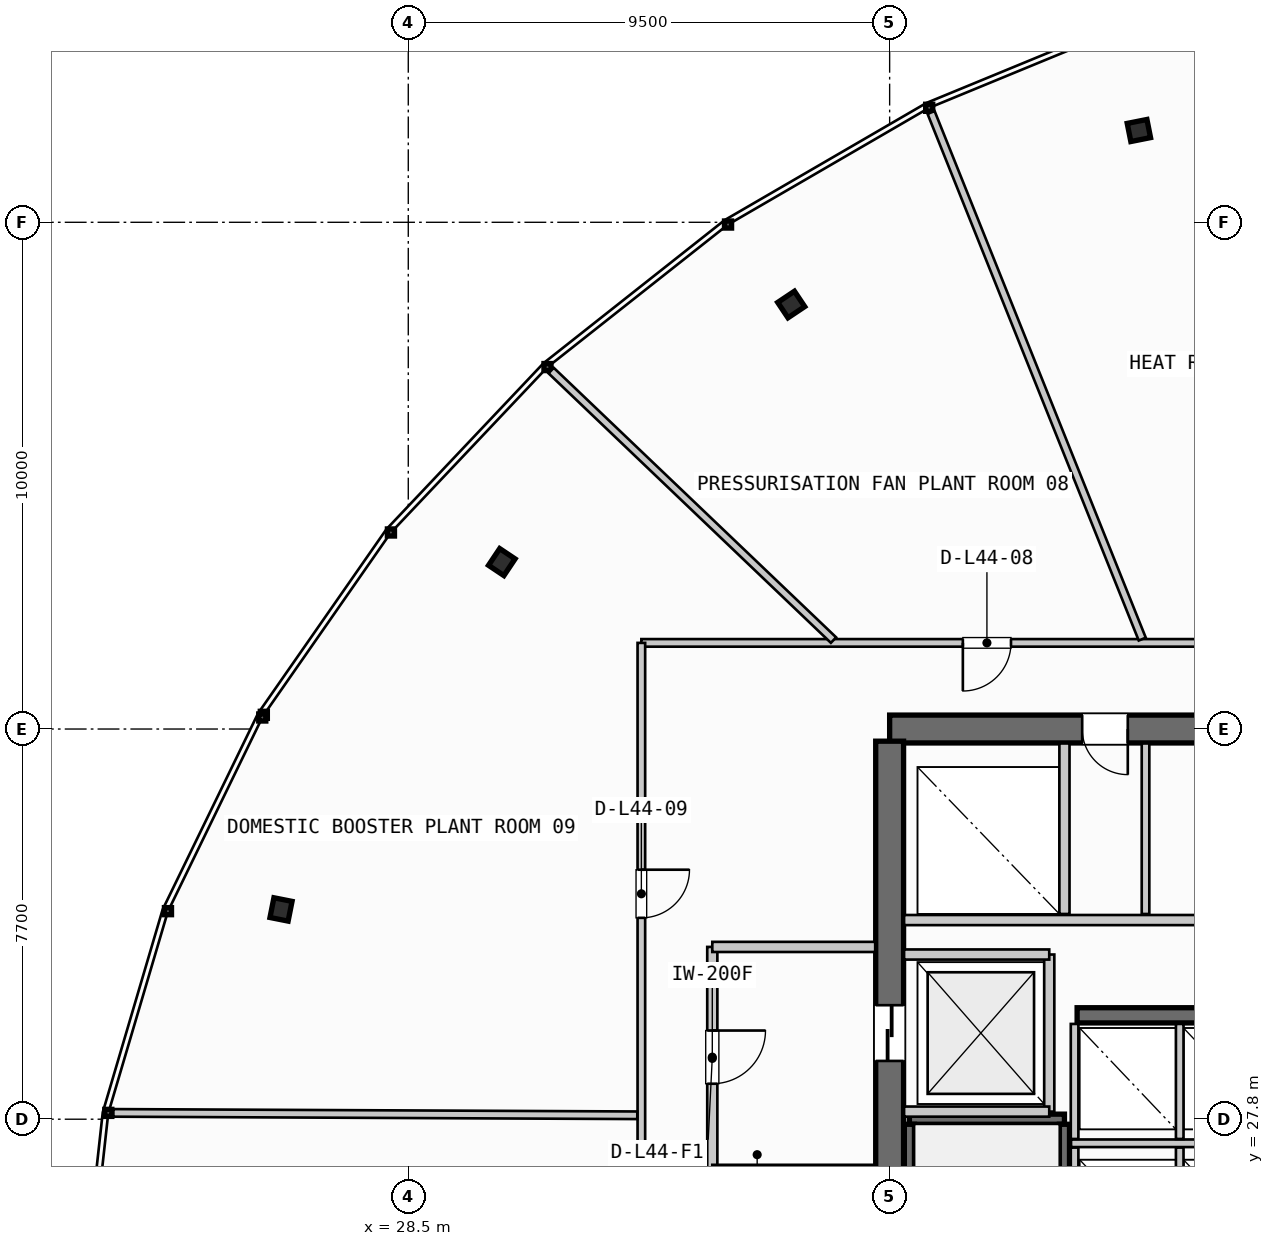
"""IFC4 building model, lengths in metres.
Left out: names, types, materials, properties, quantities, classifications, styles, units other than length and angle.
Written with IfcOpenShell. Run it as: python <this file> out.ifc"""

import sys

from ifc_helpers import new_model, si_unit, direction, frame, frame_2d, origin, origin_2d, place, context, subcontext, project, spatial, rectangle, i_section, extrude, source, transform, mapped, element, fill, save


model = new_model("IFC4")
c1 = context("Model", 3, precision=1e-05, world=origin(), true_north=direction((0.0, 1.0)))
c2 = subcontext(c1, "Body", "Model", "MODEL_VIEW")
j1 = project(units=[si_unit("LENGTHUNIT", "METRE"), si_unit("PLANEANGLEUNIT", "RADIAN")], contexts=[c1])
p1 = place(None, origin())
s1 = spatial("IfcSite", under=j1, at=p1, CompositionType="ELEMENT")
p2 = place(p1, origin())
s2 = spatial("IfcBuilding", under=s1, at=p2, CompositionType="ELEMENT")
p3 = place(p2, frame((0.0, 0.0, 171.4)))
s3 = spatial("IfcBuildingStorey", under=s2, at=p3, CompositionType="ELEMENT", Elevation=171.4)
p4 = place(p3, frame((55.6, 35.5, 0.0), z_axis=(0.0, 0.0, 1.0), x_axis=(-1.0, 0.0, 0.0)))
e1 = element("IfcWall", 1, at=p4, inside=s3, PredefinedType="SHEAR", context=c2, shape_type="SweptSolid", body=[
    extrude(rectangle(XDim=17.6, YDim=0.55, at=frame_2d((8.8, 0.0))), origin(), (0.0, 0.0, 1.0), 4.58),
])
p5 = place(p4, frame((8.05, 0.0, 0.0)))
e2 = element("IfcOpeningElement", 2, at=p5, cuts=e1, PredefinedType="OPENING", context=c2, shape_type="SweptSolid", body=[
    extrude(rectangle(XDim=1.5, YDim=2.2, at=frame_2d((0.75, 1.1))), frame((0.0, 0.285, 0.0), z_axis=(0.0, -1.0, 0.0), x_axis=(1.0, 0.0, 0.0)), (0.0, 0.0, 1.0), 0.57),
])
p6 = place(p4, frame((12.9, 0.0, 0.0)))
e3 = element("IfcOpeningElement", 3, at=p6, cuts=e1, PredefinedType="OPENING", context=c2, shape_type="SweptSolid", body=[
    extrude(rectangle(XDim=0.9, YDim=2.15, at=frame_2d((0.45, 1.075))), frame((0.0, 0.285, 0.0), z_axis=(0.0, -1.0, 0.0), x_axis=(1.0, 0.0, 0.0)), (0.0, 0.0, 1.0), 0.57),
])
p7 = place(p4, frame((10.6, 0.0, 0.0)))
e4 = element("IfcOpeningElement", 4, at=p7, cuts=e1, PredefinedType="OPENING", context=c2, shape_type="SweptSolid", body=[
    extrude(rectangle(XDim=0.95, YDim=2.15, at=frame_2d((0.475, 1.075))), frame((0.0, 0.285, 0.0), z_axis=(0.0, -1.0, 0.0), x_axis=(1.0, 0.0, 0.0)), (0.0, 0.0, 1.0), 0.57),
])
p8 = place(p3, frame((38.0, 35.26, 0.0), z_axis=(0.0, 0.0, 1.0), x_axis=(0.0, -1.0, 0.0)))
e5 = element("IfcWall", 5, at=p8, inside=s3, PredefinedType="SHEAR", context=c2, shape_type="SweptSolid", body=[
    extrude(rectangle(XDim=14.92, YDim=0.55, at=frame_2d((7.46, 0.0))), origin(), (0.0, 0.0, 1.0), 4.58),
])
p9 = place(p8, frame((5.21, 0.0, 0.0)))
e6 = element("IfcOpeningElement", 6, at=p9, cuts=e5, PredefinedType="OPENING", context=c2, shape_type="SweptSolid", body=[
    extrude(rectangle(XDim=1.1, YDim=2.2, at=frame_2d((0.55, 1.1))), frame((0.0, 0.285, 0.0), z_axis=(0.0, -1.0, 0.0), x_axis=(1.0, 0.0, 0.0)), (0.0, 0.0, 1.0), 0.57),
])
p10 = place(p3, frame((41.7, 29.85, 0.0), z_axis=(0.0, 0.0, 1.0), x_axis=(1.0, 0.0, 0.0)))
e7 = element("IfcWall", 7, at=p10, inside=s3, PredefinedType="SHEAR", context=c2, shape_type="SweptSolid", body=[
    extrude(rectangle(XDim=4.25, YDim=0.3, at=frame_2d((2.125, 0.0))), origin(), (0.0, 0.0, 1.0), 4.58),
])
m1 = source(origin(), c2, "Body", "SweptSolid", [
    extrude(i_section(OverallWidth=0.397, OverallDepth=0.365, WebThickness=0.028, FlangeThickness=0.044, FilletRadius=0.015, at=origin_2d()), origin(), (0.0, 0.0, 1.0), 4.58),
])
for number, where, z_axis, x_axis in (
    (8, (42.919, 47.311, 0.0), (0.0, 0.0, 1.0), (-0.195, 0.981, 0.0)),
    (9, (36.058, 43.877, 0.0), (0.0, 0.0, 1.0), (-0.556, 0.831, 0.0)),
    (10, (30.346, 38.794, 0.0), (0.0, 0.0, 1.0), (-0.831, 0.556, 0.0)),
    (11, (25.989, 31.94, 0.0), (0.0, 0.0, 1.0), (-0.981, 0.195, 0.0)),
):
    element("IfcColumn", number, at=place(p3, frame(where, z_axis=z_axis, x_axis=x_axis)), inside=s3, PredefinedType="COLUMN", context=c2, shape_type="MappedRepresentation", body=[
        mapped(m1, transform((0.0, 0.0, 0.0), scale=1.0)),
    ])
p11 = place(p3, frame((38.39, 27.8, 0.0), z_axis=(0.0, 0.0, 1.0), x_axis=(1.0, 0.0, 0.0)))
e12 = element("IfcWall", 12, at=p11, inside=s3, PredefinedType="SHEAR", context=c2, shape_type="SweptSolid", body=[
    extrude(rectangle(XDim=3.06, YDim=0.2, at=frame_2d((1.53, 0.0))), origin(), (0.0, 0.0, 1.0), 4.58),
])
for number, where, z_axis, x_axis in (
    (13, (41.45, 27.7, 0.0), (0.0, 0.0, 1.0), (0.0, -1.0, 0.0)),
    (14, (38.39, 20.35, 0.0), (0.0, 0.0, 1.0), (0.0, 1.0, 0.0)),
):
    element("IfcWall", number, at=place(p3, frame(where, z_axis=z_axis, x_axis=x_axis)), inside=s3, PredefinedType="SHEAR", context=c2, shape_type="SweptSolid", body=[
        extrude(rectangle(XDim=7.35, YDim=0.2, at=frame_2d((3.675, 0.0))), origin(), (0.0, 0.0, 1.0), 4.58),
    ])
p12 = place(p3, frame((41.15, 27.95, 0.0), z_axis=(0.0, 0.0, 1.0), x_axis=(0.0, 1.0, 0.0)))
e15 = element("IfcWall", 15, at=p12, inside=s3, PredefinedType="PARTITIONING", context=c2, shape_type="SweptSolid", body=[
    extrude(rectangle(XDim=3.1, YDim=0.2, at=frame_2d((1.55, 0.0))), origin(), (0.0, 0.0, 1.0), 2.355),
])
for number, where, z_axis, x_axis in (
    (16, (38.285, 27.95, 0.0), (0.0, 0.0, 1.0), (1.0, 0.0, 0.0)),
    (17, (38.285, 31.05, 0.0), (0.0, 0.0, 1.0), (1.0, 0.0, 0.0)),
):
    element("IfcWall", number, at=place(p3, frame(where, z_axis=z_axis, x_axis=x_axis)), inside=s3, PredefinedType="PARTITIONING", context=c2, shape_type="SweptSolid", body=[
        extrude(rectangle(XDim=2.865, YDim=0.2, at=frame_2d((1.433, 0.0))), origin(), (0.0, 0.0, 1.0), 2.355),
    ])
p13 = place(p3, frame((34.5, 31.2, 0.0), z_axis=(0.0, 0.0, 1.0), x_axis=(0.0, -1.0, 0.0)))
e18 = element("IfcWall", 18, at=p13, inside=s3, PredefinedType="PARTITIONING", context=c2, shape_type="SweptSolid", body=[
    extrude(rectangle(XDim=4.4, YDim=0.2, at=frame_2d((2.2, 0.0))), origin(), (0.0, 0.0, 1.0), 2.355),
])
p14 = place(p13, frame((1.65, 0.0, 0.0)))
e19 = element("IfcOpeningElement", 19, at=p14, cuts=e18, PredefinedType="OPENING", context=c2, shape_type="SweptSolid", body=[
    extrude(rectangle(XDim=1.05, YDim=2.15, at=frame_2d((0.525, 1.075))), frame((0.0, 0.11, 0.0), z_axis=(0.0, -1.0, 0.0), x_axis=(1.0, 0.0, 0.0)), (0.0, 0.0, 1.0), 0.22),
])
for number, where, z_axis, x_axis in (
    (20, (34.5, 26.8, 0.0), (0.0, 0.0, 1.0), (1.0, 0.0, 0.0)),
    (21, (34.5, 31.2, 0.0), (0.0, 0.0, 1.0), (1.0, 0.0, 0.0)),
):
    element("IfcWall", number, at=place(p3, frame(where, z_axis=z_axis, x_axis=x_axis)), inside=s3, PredefinedType="PARTITIONING", context=c2, shape_type="SweptSolid", body=[
        extrude(rectangle(XDim=3.215, YDim=0.2, at=frame_2d((1.607, 0.0))), origin(), (0.0, 0.0, 1.0), 2.355),
    ])
p15 = place(p3, frame((41.58, 27.325, 0.0), z_axis=(0.0, 0.0, 1.0), x_axis=(1.0, 0.0, 0.0)))
e22 = element("IfcWall", 22, at=p15, inside=s3, PredefinedType="PARTITIONING", context=c2, shape_type="SweptSolid", body=[
    extrude(rectangle(XDim=4.32, YDim=0.15, at=frame_2d((2.16, 0.0))), origin(), (0.0, 0.0, 1.0), 2.355),
])
for number, where, z_axis, x_axis in (
    (23, (41.65, 24.92, 0.0), (0.0, 0.0, 1.0), (0.0, 1.0, 0.0)),
    (24, (43.725, 24.92, 0.0), (0.0, 0.0, 1.0), (0.0, 1.0, 0.0)),
):
    element("IfcWall", number, at=place(p3, frame(where, z_axis=z_axis, x_axis=x_axis)), inside=s3, PredefinedType="PARTITIONING", context=c2, shape_type="SweptSolid", body=[
        extrude(rectangle(XDim=2.32, YDim=0.15, at=frame_2d((1.16, 0.0))), origin(), (0.0, 0.0, 1.0), 2.355),
    ])
for number, where, z_axis, x_axis in (
    (25, (41.65, 27.41, 0.0), (0.0, 0.0, 1.0), (0.0, 1.0, 0.0)),
    (26, (43.725, 27.41, 0.0), (0.0, 0.0, 1.0), (0.0, 1.0, 0.0)),
):
    element("IfcWall", number, at=place(p3, frame(where, z_axis=z_axis, x_axis=x_axis)), inside=s3, PredefinedType="PARTITIONING", context=c2, shape_type="SweptSolid", body=[
        extrude(rectangle(XDim=2.27, YDim=0.15, at=frame_2d((1.135, 0.0))), origin(), (0.0, 0.0, 1.0), 2.355),
    ])
p16 = place(p3, frame((41.45, 31.85, 0.0), z_axis=(0.0, 0.0, 1.0), x_axis=(0.0, 1.0, 0.0)))
e27 = element("IfcWall", 27, at=p16, inside=s3, PredefinedType="PARTITIONING", context=c2, shape_type="SweptSolid", body=[
    extrude(rectangle(XDim=3.365, YDim=0.2, at=frame_2d((1.683, 0.0))), origin(), (0.0, 0.0, 1.0), 2.355),
])
p17 = place(p3, frame((38.285, 31.73, 0.0), z_axis=(0.0, 0.0, 1.0), x_axis=(1.0, 0.0, 0.0)))
e28 = element("IfcWall", 28, at=p17, inside=s3, PredefinedType="PARTITIONING", context=c2, shape_type="SweptSolid", body=[
    extrude(rectangle(XDim=7.515, YDim=0.2, at=frame_2d((3.758, 0.0))), origin(), (0.0, 0.0, 1.0), 2.355),
])
p18 = place(p3, frame((43.05, 31.85, 0.0), z_axis=(0.0, 0.0, 1.0), x_axis=(0.0, 1.0, 0.0)))
e29 = element("IfcWall", 29, at=p18, inside=s3, PredefinedType="PLUMBINGWALL", context=c2, shape_type="SweptSolid", body=[
    extrude(rectangle(XDim=3.365, YDim=0.15, at=frame_2d((1.683, 0.0))), origin(), (0.0, 0.0, 1.0), 2.355),
])
p19 = place(p3, frame((60.5, 37.2, 0.0), z_axis=(0.0, 0.0, 1.0), x_axis=(-1.0, 0.0, 0.0)))
e30 = element("IfcWall", 30, at=p19, inside=s3, PredefinedType="PARTITIONING", context=c2, shape_type="SweptSolid", body=[
    extrude(rectangle(XDim=27.4, YDim=0.15, at=frame_2d((13.7, 0.0))), origin(), (0.0, 0.0, 1.0), 2.355),
])
p20 = place(p19, frame((5.739, 0.0, 0.0)))
e31 = element("IfcOpeningElement", 31, at=p20, cuts=e30, PredefinedType="OPENING", context=c2, shape_type="SweptSolid", body=[
    extrude(rectangle(XDim=0.95, YDim=2.15, at=frame_2d((0.475, 1.075))), frame((0.0, 0.085, 0.0), z_axis=(0.0, -1.0, 0.0), x_axis=(1.0, 0.0, 0.0)), (0.0, 0.0, 1.0), 0.17),
])
p21 = place(p19, frame((13.038, 0.0, 0.0)))
e32 = element("IfcOpeningElement", 32, at=p21, cuts=e30, PredefinedType="OPENING", context=c2, shape_type="SweptSolid", body=[
    extrude(rectangle(XDim=0.95, YDim=2.15, at=frame_2d((0.475, 1.075))), frame((0.0, 0.085, 0.0), z_axis=(0.0, -1.0, 0.0), x_axis=(1.0, 0.0, 0.0)), (0.0, 0.0, 1.0), 0.17),
])
p22 = place(p19, frame((20.105, 0.0, 0.0)))
e33 = element("IfcOpeningElement", 33, at=p22, cuts=e30, PredefinedType="OPENING", context=c2, shape_type="SweptSolid", body=[
    extrude(rectangle(XDim=0.95, YDim=2.15, at=frame_2d((0.475, 1.075))), frame((0.0, 0.085, 0.0), z_axis=(0.0, -1.0, 0.0), x_axis=(1.0, 0.0, 0.0)), (0.0, 0.0, 1.0), 0.17),
])
p23 = place(p3, frame((33.1, 37.2, 0.0), z_axis=(0.0, 0.0, 1.0), x_axis=(0.0, -1.0, 0.0)))
e34 = element("IfcWall", 34, at=p23, inside=s3, PredefinedType="PARTITIONING", context=c2, shape_type="SweptSolid", body=[
    extrude(rectangle(XDim=18.8, YDim=0.15, at=frame_2d((9.4, 0.0))), origin(), (0.0, 0.0, 1.0), 2.355),
])
p24 = place(p23, frame((4.476, 0.0, 0.0)))
e35 = element("IfcOpeningElement", 35, at=p24, cuts=e34, PredefinedType="OPENING", context=c2, shape_type="SweptSolid", body=[
    extrude(rectangle(XDim=0.95, YDim=2.15, at=frame_2d((0.475, 1.075))), frame((0.0, 0.085, 0.0), z_axis=(0.0, -1.0, 0.0), x_axis=(1.0, 0.0, 0.0)), (0.0, 0.0, 1.0), 0.17),
])
p25 = place(p23, frame((13.296, 0.0, 0.0)))
e36 = element("IfcOpeningElement", 36, at=p25, cuts=e34, PredefinedType="OPENING", context=c2, shape_type="SweptSolid", body=[
    extrude(rectangle(XDim=0.95, YDim=2.15, at=frame_2d((0.475, 1.075))), frame((0.0, 0.085, 0.0), z_axis=(0.0, -1.0, 0.0), x_axis=(1.0, 0.0, 0.0)), (0.0, 0.0, 1.0), 0.17),
])
p26 = place(p3, frame((42.986, 37.274, 0.0), z_axis=(0.0, 0.0, 1.0), x_axis=(-0.372195030978, 0.928154544737, 0.0)))
e37 = element("IfcWall", 37, at=p26, inside=s3, PredefinedType="PARTITIONING", context=c2, shape_type="SweptSolid", body=[
    extrude(rectangle(XDim=11.197, YDim=0.15, at=frame_2d((5.599, 0.0))), origin(), (0.0, 0.0, 1.0), 2.355),
])
p27 = place(p3, frame((36.892, 37.255, 0.0), z_axis=(0.0, 0.0, 1.0), x_axis=(-0.723379287328, 0.690450872014, 0.0)))
e38 = element("IfcWall", 38, at=p27, inside=s3, PredefinedType="PARTITIONING", context=c2, shape_type="SweptSolid", body=[
    extrude(rectangle(XDim=7.703, YDim=0.15, at=frame_2d((3.852, 0.0))), origin(), (0.0, 0.0, 1.0), 2.355),
])
p28 = place(p3, frame((33.02, 27.878, 0.0), z_axis=(0.0, 0.0, 1.0), x_axis=(-0.999989617809, 0.004556783214, 0.0)))
e39 = element("IfcWall", 39, at=p28, inside=s3, PredefinedType="PARTITIONING", context=c2, shape_type="SweptSolid", body=[
    extrude(rectangle(XDim=10.34, YDim=0.15, at=frame_2d((5.17, 0.0))), origin(), (0.0, 0.0, 1.0), 2.355),
])
m2 = source(origin(), c2, "Body", "SweptSolid", [
    extrude(rectangle(XDim=1.1, YDim=2.2, at=frame_2d((0.55, 1.1))), frame((0.0, 0.025, 0.0), z_axis=(0.0, -1.0, 0.0), x_axis=(1.0, 0.0, 0.0)), (0.0, 0.0, 1.0), 0.05),
])
p29 = place(p9, origin())
e40 = element("IfcDoor", 40, at=p29, inside=s3, OperationType="SLIDING_TO_LEFT", PredefinedType="DOOR", context=c2, shape_type="MappedRepresentation", body=[
    mapped(m2, transform((0.0, 0.0, 0.0), scale=1.0)),
])
fill(e6, e40)
m3 = source(origin(), c2, "Body", "SweptSolid", [
    extrude(rectangle(XDim=0.9, YDim=2.15, at=frame_2d((0.45, 1.075))), frame((0.0, 0.025, 0.0), z_axis=(0.0, -1.0, 0.0), x_axis=(1.0, 0.0, 0.0)), (0.0, 0.0, 1.0), 0.05),
])
p30 = place(p6, origin())
e41 = element("IfcDoor", 41, at=p30, inside=s3, OperationType="SINGLE_SWING_LEFT", PredefinedType="DOOR", context=c2, shape_type="MappedRepresentation", body=[
    mapped(m3, transform((0.0, 0.0, 0.0), scale=1.0)),
])
fill(e3, e41)
m4 = source(origin(), c2, "Body", "SweptSolid", [
    extrude(rectangle(XDim=1.05, YDim=2.15, at=frame_2d((0.525, 1.075))), frame((0.0, 0.025, 0.0), z_axis=(0.0, -1.0, 0.0), x_axis=(1.0, 0.0, 0.0)), (0.0, 0.0, 1.0), 0.05),
])
p31 = place(p14, origin())
e42 = element("IfcDoor", 42, at=p31, inside=s3, OperationType="SINGLE_SWING_LEFT", PredefinedType="DOOR", context=c2, shape_type="MappedRepresentation", body=[
    mapped(m4, transform((0.0, 0.0, 0.0), scale=1.0)),
])
fill(e19, e42)
m5 = source(origin(), c2, "Body", "SweptSolid", [
    extrude(rectangle(XDim=0.95, YDim=2.15, at=frame_2d((0.475, 1.075))), frame((0.0, 0.025, 0.0), z_axis=(0.0, -1.0, 0.0), x_axis=(1.0, 0.0, 0.0)), (0.0, 0.0, 1.0), 0.05),
])
p32 = place(p22, origin())
e43 = element("IfcDoor", 43, at=p32, inside=s3, OperationType="SINGLE_SWING_RIGHT", PredefinedType="DOOR", context=c2, shape_type="MappedRepresentation", body=[
    mapped(m5, transform((0.0, 0.0, 0.0), scale=1.0)),
])
fill(e33, e43)
p33 = place(p24, origin())
e44 = element("IfcDoor", 44, at=p33, inside=s3, OperationType="SINGLE_SWING_LEFT", PredefinedType="DOOR", context=c2, shape_type="MappedRepresentation", body=[
    mapped(m5, transform((0.0, 0.0, 0.0), scale=1.0)),
])
fill(e35, e44)
save(model, sys.argv[1])
